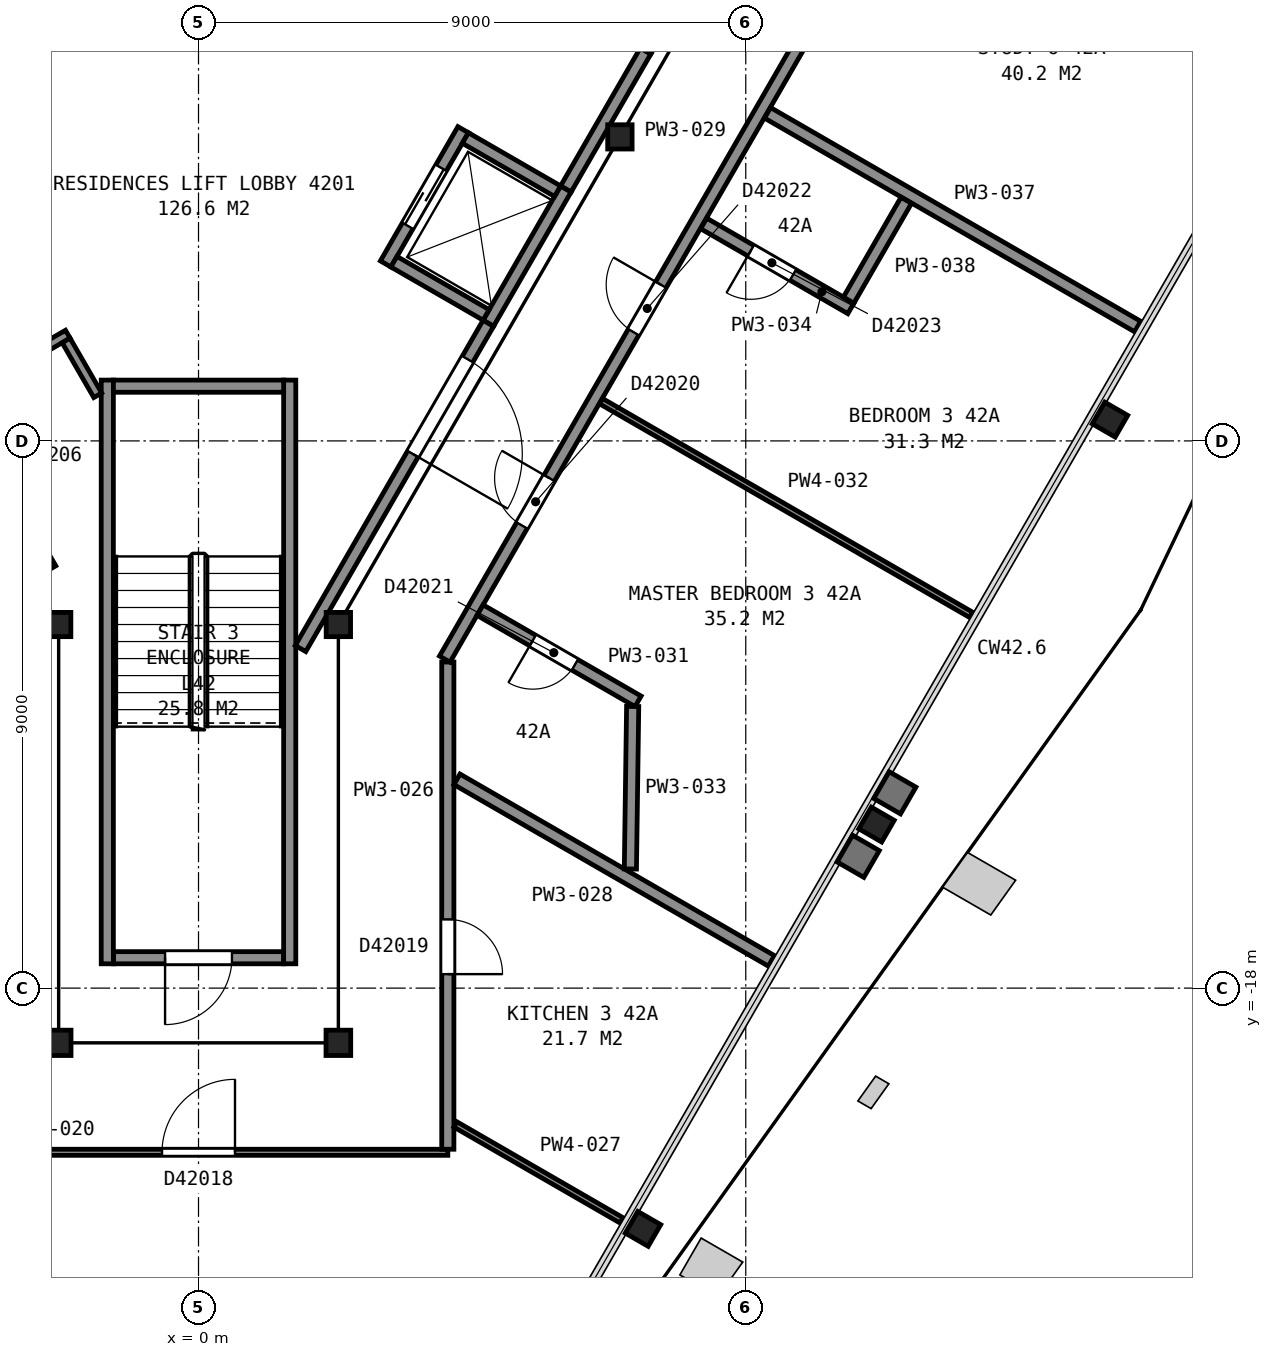
"""IFC4 building model, lengths in metres.
Left out: names, types, materials, properties, quantities, classifications, styles, units other than length and angle.
Written with IfcOpenShell. Run it as: python <this file> out.ifc"""

import sys

from ifc_helpers import new_model, si_unit, direction, frame, frame_2d, origin, origin_2d, place, context, subcontext, project, spatial, rectangle, i_section, extrude, element, fill, save


model = new_model("IFC4")
c1 = context("Model", 3, precision=1e-05, world=origin(), true_north=direction((0.0, 1.0)))
c2 = subcontext(c1, "Body", "Model", "MODEL_VIEW")
j1 = project(units=[si_unit("LENGTHUNIT", "METRE"), si_unit("PLANEANGLEUNIT", "RADIAN")], contexts=[c1])
p1 = place(None, origin())
s1 = spatial("IfcSite", under=j1, at=p1, CompositionType="ELEMENT")
p2 = place(p1, origin())
s2 = spatial("IfcBuilding", under=s1, at=p2, CompositionType="ELEMENT")
p3 = place(p2, frame((0.0, 0.0, 171.0)))
s3 = spatial("IfcBuildingStorey", under=s2, at=p3, CompositionType="ELEMENT", Elevation=171.0)
p4 = place(p3, frame((7.31, -21.96, 0.0), z_axis=(0.0, 0.0, 1.0), x_axis=(-0.5, -0.866025403784, 0.0)))
e1 = element("IfcColumn", 1, at=p4, inside=s3, PredefinedType="COLUMN", context=c2, shape_type="SweptSolid", body=[
    extrude(i_section(OverallWidth=0.411, OverallDepth=0.434, WebThickness=0.036, FlangeThickness=0.057, FilletRadius=0.015, at=origin_2d()), origin(), (0.0, 0.0, 1.0), 3.66),
])
for number, where, z_axis, x_axis in (
    (2, (11.15, -15.31, 0.0), (0.0, 0.0, 1.0), (-0.5, -0.866, 0.0)),
    (3, (14.99, -8.65, 0.0), (0.0, 0.0, 1.0), (-0.5, -0.866, 0.0)),
):
    element("IfcColumn", number, at=place(p3, frame(where, z_axis=z_axis, x_axis=x_axis)), inside=s3, PredefinedType="COLUMN", context=c2, shape_type="SweptSolid", body=[
        extrude(i_section(OverallWidth=0.411, OverallDepth=0.434, WebThickness=0.036, FlangeThickness=0.057, FilletRadius=0.015, at=origin_2d()), origin(), (0.0, 0.0, 1.0), 3.665),
    ])
p5 = place(p3, frame((-2.3, -12.02, 0.0), z_axis=(0.0, 0.0, 1.0), x_axis=(1.0, 0.0, 0.0)))
e4 = element("IfcColumn", 4, at=p5, inside=s3, PredefinedType="COLUMN", context=c2, shape_type="SweptSolid", body=[
    extrude(i_section(OverallWidth=0.401, OverallDepth=0.399, WebThickness=0.025, FlangeThickness=0.04, FilletRadius=0.015, at=origin_2d()), origin(), (0.0, 0.0, 1.0), 3.7),
])
for number, where, z_axis, x_axis in (
    (5, (-2.3, -18.9, 0.0), (0.0, 0.0, 1.0), (-1.0, 0.0, 0.0)),
    (6, (2.3, -18.9, 0.0), (0.0, 0.0, 1.0), (-1.0, 0.0, 0.0)),
):
    element("IfcColumn", number, at=place(p3, frame(where, z_axis=z_axis, x_axis=x_axis)), inside=s3, PredefinedType="COLUMN", context=c2, shape_type="SweptSolid", body=[
        extrude(i_section(OverallWidth=0.406, OverallDepth=0.417, WebThickness=0.03, FlangeThickness=0.048, FilletRadius=0.015, at=origin_2d()), origin(), (0.0, 0.0, 1.0), 3.7),
    ])
for number, where, z_axis, x_axis in (
    (7, (2.3, -12.02, 0.0), (0.0, 0.0, 1.0), (1.0, 0.0, 0.0)),
    (8, (6.93, -4.0, 0.0), (0.0, 0.0, 1.0), (1.0, 0.0, 0.0)),
):
    element("IfcColumn", number, at=place(p3, frame(where, z_axis=z_axis, x_axis=x_axis)), inside=s3, PredefinedType="COLUMN", context=c2, shape_type="SweptSolid", body=[
        extrude(i_section(OverallWidth=0.401, OverallDepth=0.399, WebThickness=0.025, FlangeThickness=0.04, FilletRadius=0.015, at=origin_2d()), origin(), (0.0, 0.0, 1.0), 3.7),
    ])
p6 = place(p3, frame((-1.4, -17.5, 0.0), z_axis=(0.0, 0.0, 1.0), x_axis=(1.0, 0.0, 0.0)))
e9 = element("IfcWall", 9, at=p6, inside=s3, PredefinedType="PARTITIONING", context=c2, shape_type="SweptSolid", body=[
    extrude(rectangle(XDim=2.8, YDim=0.2, at=frame_2d((1.4, 0.0))), origin(), (0.0, 0.0, 1.0), 3.45),
])
p7 = place(p6, frame((0.85, 0.0, 0.0)))
e10 = element("IfcOpeningElement", 10, at=p7, cuts=e9, PredefinedType="OPENING", context=c2, shape_type="SweptSolid", body=[
    extrude(rectangle(XDim=1.1, YDim=2.1, at=frame_2d((0.55, 1.05))), frame((0.0, 0.11, 0.0), z_axis=(0.0, -1.0, 0.0), x_axis=(1.0, 0.0, 0.0)), (0.0, 0.0, 1.0), 0.22),
])
for number, where, z_axis, x_axis in (
    (11, (1.5, -8.0, 0.0), (0.0, 0.0, 1.0), (0.0, -1.0, 0.0)),
    (12, (-1.5, -8.0, 0.0), (0.0, 0.0, 1.0), (0.0, -1.0, 0.0)),
):
    element("IfcWall", number, at=place(p3, frame(where, z_axis=z_axis, x_axis=x_axis)), inside=s3, PredefinedType="PARTITIONING", context=c2, shape_type="SweptSolid", body=[
        extrude(rectangle(XDim=9.6, YDim=0.2, at=frame_2d((4.8, 0.0))), origin(), (0.0, 0.0, 1.0), 3.45),
    ])
p8 = place(p3, frame((-1.4, -8.1, 0.0), z_axis=(0.0, 0.0, 1.0), x_axis=(1.0, 0.0, 0.0)))
e13 = element("IfcWall", 13, at=p8, inside=s3, PredefinedType="PARTITIONING", context=c2, shape_type="SweptSolid", body=[
    extrude(rectangle(XDim=2.8, YDim=0.2, at=frame_2d((1.4, 0.0))), origin(), (0.0, 0.0, 1.0), 3.45),
])
p9 = place(p3, frame((4.766, -7.065, 0.0), z_axis=(0.0, 0.0, 1.0), x_axis=(0.499948979701, 0.866054858364, 0.0)))
e14 = element("IfcWall", 14, at=p9, inside=s3, PredefinedType="PARTITIONING", context=c2, shape_type="SweptSolid", body=[
    extrude(rectangle(XDim=2.55, YDim=0.2, at=frame_2d((1.275, 0.0))), origin(), (0.0, 0.0, 1.0), 3.7),
])
p10 = place(p3, frame((7.351, -2.587, 0.0), z_axis=(0.0, 0.0, 1.0), x_axis=(0.500002801628, 0.866023786258, 0.0)))
e15 = element("IfcWall", 15, at=p10, inside=s3, PredefinedType="PARTITIONING", context=c2, shape_type="SweptSolid", body=[
    extrude(rectangle(XDim=4.9, YDim=0.2, at=frame_2d((2.45, 0.0))), origin(), (0.0, 0.0, 1.0), 3.7),
])
p11 = place(p3, frame((3.077, -6.09, 0.0), z_axis=(0.0, 0.0, 1.0), x_axis=(0.500062241894, 0.865989465428, 0.0)))
e16 = element("IfcWall", 16, at=p11, inside=s3, PredefinedType="PARTITIONING", context=c2, shape_type="SweptSolid", body=[
    extrude(rectangle(XDim=2.55, YDim=0.2, at=frame_2d((1.275, 0.0))), origin(), (0.0, 0.0, 1.0), 3.7),
])
p12 = place(p11, frame((0.725, 0.0, 0.0)))
e17 = element("IfcOpeningElement", 17, at=p12, cuts=e16, PredefinedType="OPENING", context=c2, shape_type="SweptSolid", body=[
    extrude(rectangle(XDim=1.1, YDim=2.1, at=frame_2d((0.55, 1.05))), frame((0.0, 0.11, 0.0), z_axis=(0.0, -1.0, 0.0), x_axis=(1.0, 0.0, 0.0)), (0.0, 0.0, 1.0), 0.22),
])
p13 = place(p3, frame((5.905, -4.893, 0.0), z_axis=(0.0, 0.0, 1.0), x_axis=(-0.866002029911, 0.500040482552, 0.0)))
e18 = element("IfcWall", 18, at=p13, inside=s3, PredefinedType="PARTITIONING", context=c2, shape_type="SweptSolid", body=[
    extrude(rectangle(XDim=1.75, YDim=0.2, at=frame_2d((0.875, 0.0))), origin(), (0.0, 0.0, 1.0), 3.7),
])
p14 = place(p3, frame((4.73, -6.928, 0.0), z_axis=(0.0, 0.0, 1.0), x_axis=(-0.866036909293, 0.499980071345, 0.0)))
e19 = element("IfcWall", 19, at=p14, inside=s3, PredefinedType="PARTITIONING", context=c2, shape_type="SweptSolid", body=[
    extrude(rectangle(XDim=1.75, YDim=0.2, at=frame_2d((0.875, 0.0))), origin(), (0.0, 0.0, 1.0), 3.7),
])
p15 = place(p3, frame((-4.655, -7.257, 0.0), z_axis=(0.0, 0.0, 1.0), x_axis=(0.499892115999, -0.866087681682, 0.0)))
e20 = element("IfcWall", 20, at=p15, inside=s3, PredefinedType="PARTITIONING", context=c2, shape_type="SweptSolid", body=[
    extrude(rectangle(XDim=4.443, YDim=0.2, at=frame_2d((2.221, 0.0))), origin(), (0.0, 0.0, 1.0), 3.45),
])
p16 = place(p3, frame((-2.15, -7.246, 0.0), z_axis=(0.0, 0.0, 1.0), x_axis=(-0.866099396229, -0.499871819421, 0.0)))
e21 = element("IfcWall", 21, at=p16, inside=s3, PredefinedType="PARTITIONING", context=c2, shape_type="SweptSolid", body=[
    extrude(rectangle(XDim=2.075, YDim=0.15, at=frame_2d((1.038, 0.0))), origin(), (0.0, 0.0, 1.0), 3.45),
])
p17 = place(p16, frame((0.675, 0.0, 0.0)))
e22 = element("IfcOpeningElement", 22, at=p17, cuts=e21, PredefinedType="OPENING", context=c2, shape_type="SweptSolid", body=[
    extrude(rectangle(XDim=0.9, YDim=2.1, at=frame_2d((0.45, 1.05))), frame((0.0, 0.085, 0.0), z_axis=(0.0, -1.0, 0.0), x_axis=(1.0, 0.0, 0.0)), (0.0, 0.0, 1.0), 0.17),
])
p18 = place(p3, frame((-2.177, -7.348, 0.0), z_axis=(0.0, 0.0, 1.0), x_axis=(0.49972245349, -0.866185586049, 0.0)))
e23 = element("IfcWall", 23, at=p18, inside=s3, PredefinedType="PARTITIONING", context=c2, shape_type="SweptSolid", body=[
    extrude(rectangle(XDim=1.041, YDim=0.15, at=frame_2d((0.52, 0.0))), origin(), (0.0, 0.0, 1.0), 3.45),
])
p19 = place(p3, frame((1.677, -12.415, 0.0), z_axis=(0.0, 0.0, 1.0), x_axis=(0.500054337157, 0.865994029939, 0.0)))
e24 = element("IfcWall", 24, at=p19, inside=s3, PredefinedType="PARTITIONING", context=c2, shape_type="SweptSolid", body=[
    extrude(rectangle(XDim=6.177, YDim=0.2, at=frame_2d((3.088, 0.0))), origin(), (0.0, 0.0, 1.0), 3.45),
])
p20 = place(p19, frame((3.695, 0.0, 0.0)))
e25 = element("IfcOpeningElement", 25, at=p20, cuts=e24, PredefinedType="OPENING", context=c2, shape_type="SweptSolid", body=[
    extrude(rectangle(XDim=1.8, YDim=2.1, at=frame_2d((0.9, 1.05))), frame((0.0, 0.11, 0.0), z_axis=(0.0, -1.0, 0.0), x_axis=(1.0, 0.0, 0.0)), (0.0, 0.0, 1.0), 0.22),
])
p21 = place(p3, frame((6.042, -4.855, 0.0), z_axis=(0.0, 0.0, 1.0), x_axis=(0.500252727967, 0.865879442048, 0.0)))
e26 = element("IfcWall", 26, at=p21, inside=s3, PredefinedType="PARTITIONING", context=c2, shape_type="SweptSolid", body=[
    extrude(rectangle(XDim=2.617, YDim=0.2, at=frame_2d((1.309, 0.0))), origin(), (0.0, 0.0, 1.0), 3.45),
])
p22 = place(p3, frame((4.1, -20.7, 0.0), z_axis=(0.0, 0.0, 1.0), x_axis=(-1.0, 0.0, 0.0)))
e27 = element("IfcWall", 27, at=p22, inside=s3, PredefinedType="PARTITIONING", context=c2, shape_type="SweptSolid", body=[
    extrude(rectangle(XDim=8.25, YDim=0.1, at=frame_2d((4.125, 0.0))), origin(), (0.0, 0.0, 1.0), 2.713),
])
p23 = place(p22, frame((3.5, 0.0, 0.0)))
e28 = element("IfcOpeningElement", 28, at=p23, cuts=e27, PredefinedType="OPENING", context=c2, shape_type="SweptSolid", body=[
    extrude(rectangle(XDim=1.2, YDim=2.1, at=frame_2d((0.6, 1.05))), frame((0.0, 0.06, 0.0), z_axis=(0.0, -1.0, 0.0), x_axis=(1.0, 0.0, 0.0)), (0.0, 0.0, 1.0), 0.12),
])
p24 = place(p3, frame((4.1, -12.637, 0.0), z_axis=(0.0, 0.0, 1.0), x_axis=(0.0, -1.0, 0.0)))
e29 = element("IfcWall", 29, at=p24, inside=s3, PredefinedType="PARTITIONING", context=c2, shape_type="SweptSolid", body=[
    extrude(rectangle(XDim=8.013, YDim=0.2, at=frame_2d((4.006, 0.0))), origin(), (0.0, 0.0, 1.0), 2.713),
])
p25 = place(p24, frame((4.233, 0.0, 0.0)))
e30 = element("IfcOpeningElement", 30, at=p25, cuts=e29, PredefinedType="OPENING", context=c2, shape_type="SweptSolid", body=[
    extrude(rectangle(XDim=0.9, YDim=2.1, at=frame_2d((0.45, 1.05))), frame((0.0, 0.11, 0.0), z_axis=(0.0, -1.0, 0.0), x_axis=(1.0, 0.0, 0.0)), (0.0, 0.0, 1.0), 0.22),
])
p26 = place(p3, frame((4.225, -20.242, 0.0), z_axis=(0.0, 0.0, 1.0), x_axis=(0.866015493058, -0.500017165488, 0.0)))
e31 = element("IfcWall", 31, at=p26, inside=s3, PredefinedType="PARTITIONING", context=c2, shape_type="SweptSolid", body=[
    extrude(rectangle(XDim=3.155, YDim=0.1, at=frame_2d((1.578, 0.0))), origin(), (0.0, 0.0, 1.0), 2.713),
])
p27 = place(p3, frame((4.25, -14.566, 0.0), z_axis=(0.0, 0.0, 1.0), x_axis=(0.865990187664, -0.500060991149, 0.0)))
e32 = element("IfcWall", 32, at=p27, inside=s3, PredefinedType="PARTITIONING", context=c2, shape_type="SweptSolid", body=[
    extrude(rectangle(XDim=5.972, YDim=0.2, at=frame_2d((2.986, 0.0))), origin(), (0.0, 0.0, 1.0), 2.713),
])
p28 = place(p3, frame((12.916, 2.767, 0.0), z_axis=(0.0, 0.0, 1.0), x_axis=(-0.499999767326, -0.866025538119, 0.0)))
e33 = element("IfcWall", 33, at=p28, inside=s3, PredefinedType="PARTITIONING", context=c2, shape_type="SweptSolid", body=[
    extrude(rectangle(XDim=17.731, YDim=0.2, at=frame_2d((8.865, 0.0))), origin(), (0.0, 0.0, 1.0), 2.713),
])
p29 = place(p28, frame((14.293, 0.0, 0.0)))
e34 = element("IfcOpeningElement", 34, at=p29, cuts=e33, PredefinedType="OPENING", context=c2, shape_type="SweptSolid", body=[
    extrude(rectangle(XDim=0.9, YDim=2.1, at=frame_2d((0.45, 1.05))), frame((0.0, 0.11, 0.0), z_axis=(0.0, -1.0, 0.0), x_axis=(1.0, 0.0, 0.0)), (0.0, 0.0, 1.0), 0.22),
])
p30 = place(p28, frame((10.622, 0.0, 0.0)))
e35 = element("IfcOpeningElement", 35, at=p30, cuts=e33, PredefinedType="OPENING", context=c2, shape_type="SweptSolid", body=[
    extrude(rectangle(XDim=0.9, YDim=2.1, at=frame_2d((0.45, 1.05))), frame((0.0, 0.11, 0.0), z_axis=(0.0, -1.0, 0.0), x_axis=(1.0, 0.0, 0.0)), (0.0, 0.0, 1.0), 0.22),
])
p31 = place(p28, frame((3.897, 0.0, 0.0)))
e36 = element("IfcOpeningElement", 36, at=p31, cuts=e33, PredefinedType="OPENING", context=c2, shape_type="SweptSolid", body=[
    extrude(rectangle(XDim=0.9, YDim=2.1, at=frame_2d((0.45, 1.05))), frame((0.0, 0.11, 0.0), z_axis=(0.0, -1.0, 0.0), x_axis=(1.0, 0.0, 0.0)), (0.0, 0.0, 1.0), 0.22),
])
p32 = place(p28, frame((0.283, 0.0, 0.0)))
e37 = element("IfcOpeningElement", 37, at=p32, cuts=e33, PredefinedType="OPENING", context=c2, shape_type="SweptSolid", body=[
    extrude(rectangle(XDim=0.9, YDim=2.1, at=frame_2d((0.45, 1.05))), frame((0.0, 0.11, 0.0), z_axis=(0.0, -1.0, 0.0), x_axis=(1.0, 0.0, 0.0)), (0.0, 0.0, 1.0), 0.22),
])
p33 = place(p3, frame((7.229, -13.283, 0.0), z_axis=(0.0, 0.0, 1.0), x_axis=(-0.866010750942, 0.50002537861, 0.0)))
e38 = element("IfcWall", 38, at=p33, inside=s3, PredefinedType="PARTITIONING", context=c2, shape_type="SweptSolid", body=[
    extrude(rectangle(XDim=3.0, YDim=0.2, at=frame_2d((1.5, 0.0))), origin(), (0.0, 0.0, 1.0), 2.713),
])
p34 = place(p33, frame((1.2, 0.0, 0.0)))
e39 = element("IfcOpeningElement", 39, at=p34, cuts=e38, PredefinedType="OPENING", context=c2, shape_type="SweptSolid", body=[
    extrude(rectangle(XDim=0.8, YDim=2.1, at=frame_2d((0.4, 1.05))), frame((0.0, 0.11, 0.0), z_axis=(0.0, -1.0, 0.0), x_axis=(1.0, 0.0, 0.0)), (0.0, 0.0, 1.0), 0.22),
])
p35 = place(p3, frame((6.62, -8.346, 0.0), z_axis=(0.0, 0.0, 1.0), x_axis=(0.866005124189, -0.500035123644, 0.0)))
e40 = element("IfcWall", 40, at=p35, inside=s3, PredefinedType="PARTITIONING", context=c2, shape_type="SweptSolid", body=[
    extrude(rectangle(XDim=7.029, YDim=0.1, at=frame_2d((3.515, 0.0))), origin(), (0.0, 0.0, 1.0), 2.713),
])
p36 = place(p3, frame((7.102, -16.041, 0.0), z_axis=(0.0, 0.0, 1.0), x_axis=(0.014157711251, 0.999899774584, 0.0)))
e41 = element("IfcWall", 41, at=p36, inside=s3, PredefinedType="PARTITIONING", context=c2, shape_type="SweptSolid", body=[
    extrude(rectangle(XDim=2.673, YDim=0.2, at=frame_2d((1.336, 0.0))), origin(), (0.0, 0.0, 1.0), 2.713),
])
p37 = place(p3, frame((8.308, -5.424, 0.0), z_axis=(0.0, 0.0, 1.0), x_axis=(0.866041588165, -0.499971966783, 0.0)))
e42 = element("IfcWall", 42, at=p37, inside=s3, PredefinedType="PARTITIONING", context=c2, shape_type="SweptSolid", body=[
    extrude(rectangle(XDim=2.795, YDim=0.2, at=frame_2d((1.397, 0.0))), origin(), (0.0, 0.0, 1.0), 2.713),
])
p38 = place(p37, frame((0.895, 0.0, 0.0)))
e43 = element("IfcOpeningElement", 43, at=p38, cuts=e42, PredefinedType="OPENING", context=c2, shape_type="SweptSolid", body=[
    extrude(rectangle(XDim=0.8, YDim=2.1, at=frame_2d((0.4, 1.05))), frame((0.0, 0.11, 0.0), z_axis=(0.0, -1.0, 0.0), x_axis=(1.0, 0.0, 0.0)), (0.0, 0.0, 1.0), 0.22),
])
p39 = place(p3, frame((9.358, -3.604, 0.0), z_axis=(0.0, 0.0, 1.0), x_axis=(0.866011480283, -0.500024115436, 0.0)))
e44 = element("IfcWall", 44, at=p39, inside=s3, PredefinedType="PARTITIONING", context=c2, shape_type="SweptSolid", body=[
    extrude(rectangle(XDim=7.029, YDim=0.2, at=frame_2d((3.515, 0.0))), origin(), (0.0, 0.0, 1.0), 2.713),
])
p40 = place(p3, frame((10.692, -6.684, 0.0), z_axis=(0.0, 0.0, 1.0), x_axis=(0.499949193323, 0.866054735046, 0.0)))
e45 = element("IfcWall", 45, at=p40, inside=s3, PredefinedType="PARTITIONING", context=c2, shape_type="SweptSolid", body=[
    extrude(rectangle(XDim=1.895, YDim=0.2, at=frame_2d((0.948, 0.0))), origin(), (0.0, 0.0, 1.0), 2.713),
])
p41 = place(p7, origin())
e46 = element("IfcDoor", 46, at=p41, inside=s3, OperationType="SINGLE_SWING_LEFT", PredefinedType="DOOR", context=c2, shape_type="SweptSolid", body=[
    extrude(rectangle(XDim=1.1, YDim=2.1, at=frame_2d((0.55, 1.05))), frame((0.0, 0.025, 0.0), z_axis=(0.0, -1.0, 0.0), x_axis=(1.0, 0.0, 0.0)), (0.0, 0.0, 1.0), 0.05),
])
fill(e10, e46)
p42 = place(p12, origin())
e47 = element("IfcDoor", 47, at=p42, inside=s3, OperationType="SLIDING_TO_LEFT", PredefinedType="DOOR", context=c2, shape_type="SweptSolid", body=[
    extrude(rectangle(XDim=1.1, YDim=2.1, at=frame_2d((0.55, 1.05))), frame((0.0, 0.025, 0.0), z_axis=(0.0, -1.0, 0.0), x_axis=(1.0, 0.0, 0.0)), (0.0, 0.0, 1.0), 0.05),
])
fill(e17, e47)
p43 = place(p20, origin())
e48 = element("IfcDoor", 48, at=p43, inside=s3, OperationType="DOUBLE_DOOR_SINGLE_SWING", PredefinedType="DOOR", context=c2, shape_type="SweptSolid", body=[
    extrude(rectangle(XDim=1.8, YDim=2.1, at=frame_2d((0.9, 1.05))), frame((0.0, 0.025, 0.0), z_axis=(0.0, -1.0, 0.0), x_axis=(1.0, 0.0, 0.0)), (0.0, 0.0, 1.0), 0.05),
])
fill(e25, e48)
p44 = place(p23, origin())
e49 = element("IfcDoor", 49, at=p44, inside=s3, OperationType="SINGLE_SWING_LEFT", PredefinedType="DOOR", context=c2, shape_type="SweptSolid", body=[
    extrude(rectangle(XDim=1.2, YDim=2.1, at=frame_2d((0.6, 1.05))), frame((0.0, 0.025, 0.0), z_axis=(0.0, -1.0, 0.0), x_axis=(1.0, 0.0, 0.0)), (0.0, 0.0, 1.0), 0.05),
])
fill(e28, e49)
p45 = place(p25, origin())
e50 = element("IfcDoor", 50, at=p45, inside=s3, OperationType="SINGLE_SWING_RIGHT", PredefinedType="DOOR", context=c2, shape_type="SweptSolid", body=[
    extrude(rectangle(XDim=0.9, YDim=2.1, at=frame_2d((0.45, 1.05))), frame((0.0, 0.025, 0.0), z_axis=(0.0, -1.0, 0.0), x_axis=(1.0, 0.0, 0.0)), (0.0, 0.0, 1.0), 0.05),
])
fill(e30, e50)
p46 = place(p29, origin())
e51 = element("IfcDoor", 51, at=p46, inside=s3, OperationType="SINGLE_SWING_LEFT", PredefinedType="DOOR", context=c2, shape_type="SweptSolid", body=[
    extrude(rectangle(XDim=0.9, YDim=2.1, at=frame_2d((0.45, 1.05))), frame((0.0, 0.025, 0.0), z_axis=(0.0, -1.0, 0.0), x_axis=(1.0, 0.0, 0.0)), (0.0, 0.0, 1.0), 0.05),
])
fill(e34, e51)
p47 = place(p30, origin())
e52 = element("IfcDoor", 52, at=p47, inside=s3, OperationType="SINGLE_SWING_LEFT", PredefinedType="DOOR", context=c2, shape_type="SweptSolid", body=[
    extrude(rectangle(XDim=0.9, YDim=2.1, at=frame_2d((0.45, 1.05))), frame((0.0, 0.025, 0.0), z_axis=(0.0, -1.0, 0.0), x_axis=(1.0, 0.0, 0.0)), (0.0, 0.0, 1.0), 0.05),
])
fill(e35, e52)
p48 = place(p34, origin())
e53 = element("IfcDoor", 53, at=p48, inside=s3, OperationType="SINGLE_SWING_RIGHT", PredefinedType="DOOR", context=c2, shape_type="SweptSolid", body=[
    extrude(rectangle(XDim=0.8, YDim=2.1, at=frame_2d((0.4, 1.05))), frame((0.0, 0.025, 0.0), z_axis=(0.0, -1.0, 0.0), x_axis=(1.0, 0.0, 0.0)), (0.0, 0.0, 1.0), 0.05),
])
fill(e39, e53)
p49 = place(p38, origin())
e54 = element("IfcDoor", 54, at=p49, inside=s3, OperationType="SINGLE_SWING_LEFT", PredefinedType="DOOR", context=c2, shape_type="SweptSolid", body=[
    extrude(rectangle(XDim=0.8, YDim=2.1, at=frame_2d((0.4, 1.05))), frame((0.0, 0.025, 0.0), z_axis=(0.0, -1.0, 0.0), x_axis=(1.0, 0.0, 0.0)), (0.0, 0.0, 1.0), 0.05),
])
fill(e43, e54)
save(model, sys.argv[1])
